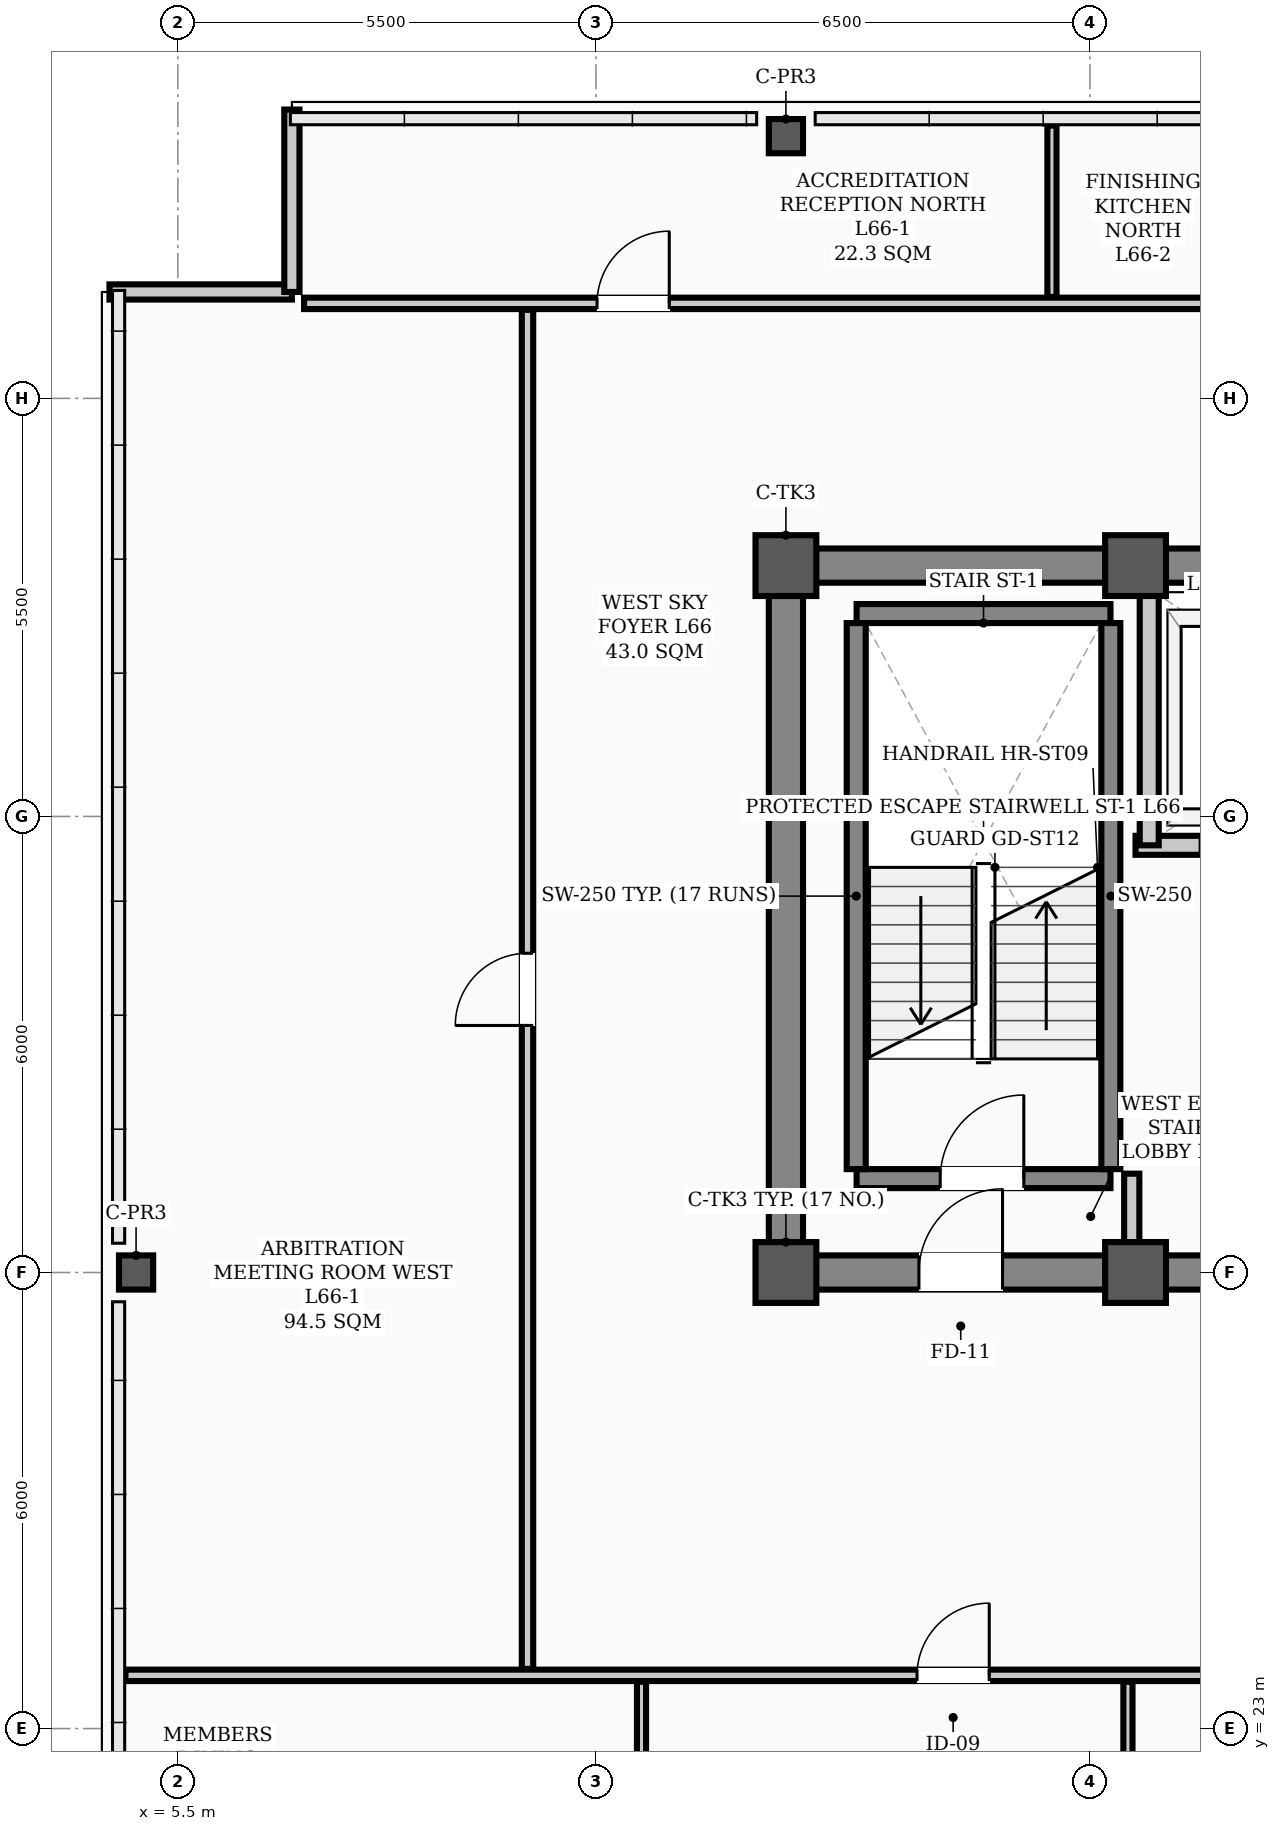
"""IFC4 building model, lengths in metres.
Left out: names, types, materials, properties, quantities, classifications, styles, units other than length and angle.
Written with IfcOpenShell. Run it as: python <this file> out.ifc"""

import sys

from ifc_helpers import new_model, si_unit, direction, frame, frame_2d, origin, origin_2d, place, context, subcontext, project, spatial, rectangle, hollow_rectangle, extrude, element, fill, save


model = new_model("IFC4")
c1 = context("Model", 3, precision=1e-05, world=origin(), true_north=direction((0.0, 1.0)))
c2 = subcontext(c1, "Body", "Model", "MODEL_VIEW")
j1 = project(units=[si_unit("LENGTHUNIT", "METRE"), si_unit("PLANEANGLEUNIT", "RADIAN")], contexts=[c1])
p1 = place(None, origin())
s1 = spatial("IfcSite", under=j1, at=p1, CompositionType="ELEMENT")
p2 = place(p1, origin())
s2 = spatial("IfcBuilding", under=s1, at=p2, CompositionType="ELEMENT")
p3 = place(p2, frame((0.0, 0.0, 265.7)))
s3 = spatial("IfcBuildingStorey", under=s2, at=p3, CompositionType="ELEMENT", Elevation=265.7)
for number, where, z_axis, x_axis in (
    (1, (13.5, 29.0, 0.0), (0.0, 0.0, 1.0), (1.0, 0.0, 0.0)),
    (2, (13.5, 38.3, 0.0), (0.0, 0.0, 1.0), (1.0, 0.0, 0.0)),
    (3, (18.1, 29.0, 0.0), (0.0, 0.0, 1.0), (1.0, 0.0, 0.0)),
    (4, (18.1, 38.3, 0.0), (0.0, 0.0, 1.0), (1.0, 0.0, 0.0)),
):
    element("IfcColumn", number, at=place(p3, frame(where, z_axis=z_axis, x_axis=x_axis)), inside=s3, PredefinedType="COLUMN", context=c2, shape_type="SweptSolid", body=[
        extrude(hollow_rectangle(XDim=0.8, YDim=0.8, WallThickness=0.032, InnerFilletRadius=0.016, OuterFilletRadius=0.048, at=origin_2d()), origin(), (0.0, 0.0, 1.0), 3.9),
    ])
for number, where, z_axis, x_axis in (
    (5, (4.95, 29.0, 0.0), (0.0, 0.0, 1.0), (1.0, 0.0, 0.0)),
    (6, (13.5, 43.95, 0.0), (0.0, 0.0, 1.0), (1.0, 0.0, 0.0)),
):
    element("IfcColumn", number, at=place(p3, frame(where, z_axis=z_axis, x_axis=x_axis)), inside=s3, PredefinedType="COLUMN", context=c2, shape_type="SweptSolid", body=[
        extrude(hollow_rectangle(XDim=0.45, YDim=0.45, WallThickness=0.022, InnerFilletRadius=0.022, OuterFilletRadius=0.044, at=origin_2d()), origin(), (0.0, 0.0, 1.0), 3.9),
    ])
p4 = place(p3, frame((4.6, 41.9, 0.0), z_axis=(0.0, 0.0, 1.0), x_axis=(1.0, 0.0, 0.0)))
e7 = element("IfcWall", 7, at=p4, inside=s3, PredefinedType="PARAPET", context=c2, shape_type="SweptSolid", body=[
    extrude(rectangle(XDim=2.4, YDim=0.2, at=frame_2d((1.2, 0.0))), origin(), (0.0, 0.0, 1.0), 1.2),
])
p5 = place(p3, frame((7.0, 41.9, 0.0), z_axis=(0.0, 0.0, 1.0), x_axis=(0.0, 1.0, 0.0)))
e8 = element("IfcWall", 8, at=p5, inside=s3, PredefinedType="PARAPET", context=c2, shape_type="SweptSolid", body=[
    extrude(rectangle(XDim=2.4, YDim=0.2, at=frame_2d((1.2, 0.0))), origin(), (0.0, 0.0, 1.0), 1.2),
])
p6 = place(p3, frame((13.5, 29.0, 0.0), z_axis=(0.0, 0.0, 1.0), x_axis=(1.0, 0.0, 0.0)))
e9 = element("IfcWall", 9, at=p6, inside=s3, PredefinedType="SHEAR", context=c2, shape_type="SweptSolid", body=[
    extrude(rectangle(XDim=30.5, YDim=0.45, at=frame_2d((15.25, 0.0))), origin(), (0.0, 0.0, 1.0), 3.72),
])
p7 = place(p6, frame((1.75, 0.0, 0.0)))
e10 = element("IfcOpeningElement", 10, at=p7, cuts=e9, PredefinedType="OPENING", context=c2, shape_type="SweptSolid", body=[
    extrude(rectangle(XDim=1.1, YDim=2.08, at=frame_2d((0.55, 1.04))), frame((0.0, 0.235, 0.0), z_axis=(0.0, -1.0, 0.0), x_axis=(1.0, 0.0, 0.0)), (0.0, 0.0, 1.0), 0.47),
])
p8 = place(p6, frame((26.7, 0.0, 0.0)))
e11 = element("IfcOpeningElement", 11, at=p8, cuts=e9, PredefinedType="OPENING", context=c2, shape_type="SweptSolid", body=[
    extrude(rectangle(XDim=1.1, YDim=2.08, at=frame_2d((0.55, 1.04))), frame((0.0, 0.235, 0.0), z_axis=(0.0, -1.0, 0.0), x_axis=(1.0, 0.0, 0.0)), (0.0, 0.0, 1.0), 0.47),
])
p9 = place(p6, frame((6.8, 0.0, 0.0)))
e12 = element("IfcOpeningElement", 12, at=p9, cuts=e9, PredefinedType="OPENING", context=c2, shape_type="SweptSolid", body=[
    extrude(rectangle(XDim=1.1, YDim=2.08, at=frame_2d((0.55, 1.04))), frame((0.0, 0.235, 0.0), z_axis=(0.0, -1.0, 0.0), x_axis=(1.0, 0.0, 0.0)), (0.0, 0.0, 1.0), 0.47),
])
p10 = place(p6, frame((13.2, 0.0, 0.0)))
e13 = element("IfcOpeningElement", 13, at=p10, cuts=e9, PredefinedType="OPENING", context=c2, shape_type="SweptSolid", body=[
    extrude(rectangle(XDim=1.6, YDim=2.08, at=frame_2d((0.8, 1.04))), frame((0.0, 0.235, 0.0), z_axis=(0.0, -1.0, 0.0), x_axis=(1.0, 0.0, 0.0)), (0.0, 0.0, 1.0), 0.47),
])
p11 = place(p6, frame((20.525, 0.0, 0.0)))
e14 = element("IfcOpeningElement", 14, at=p11, cuts=e9, PredefinedType="OPENING", context=c2, shape_type="SweptSolid", body=[
    extrude(rectangle(XDim=0.95, YDim=2.08, at=frame_2d((0.475, 1.04))), frame((0.0, 0.235, 0.0), z_axis=(0.0, -1.0, 0.0), x_axis=(1.0, 0.0, 0.0)), (0.0, 0.0, 1.0), 0.47),
])
p12 = place(p3, frame((13.5, 38.3, 0.0), z_axis=(0.0, 0.0, 1.0), x_axis=(1.0, 0.0, 0.0)))
e15 = element("IfcWall", 15, at=p12, inside=s3, PredefinedType="SHEAR", context=c2, shape_type="SweptSolid", body=[
    extrude(rectangle(XDim=30.5, YDim=0.45, at=frame_2d((15.25, 0.0))), origin(), (0.0, 0.0, 1.0), 3.72),
])
p13 = place(p3, frame((13.5, 29.35, 0.0), z_axis=(0.0, 0.0, 1.0), x_axis=(0.0, 1.0, 0.0)))
e16 = element("IfcWall", 16, at=p13, inside=s3, PredefinedType="SHEAR", context=c2, shape_type="SweptSolid", body=[
    extrude(rectangle(XDim=8.6, YDim=0.45, at=frame_2d((4.3, 0.0))), origin(), (0.0, 0.0, 1.0), 3.72),
])
p14 = place(p3, frame((14.43, 30.235, 0.0), z_axis=(0.0, 0.0, 1.0), x_axis=(1.0, 0.0, 0.0)))
e17 = element("IfcWall", 17, at=p14, inside=s3, PredefinedType="STANDARD", context=c2, shape_type="SweptSolid", body=[
    extrude(rectangle(XDim=3.34, YDim=0.25, at=frame_2d((1.67, 0.0))), origin(), (0.0, 0.0, 1.0), 3.72),
])
p15 = place(p14, frame((1.1, 0.0, 0.0)))
e18 = element("IfcOpeningElement", 18, at=p15, cuts=e17, PredefinedType="OPENING", context=c2, shape_type="SweptSolid", body=[
    extrude(rectangle(XDim=1.1, YDim=2.08, at=frame_2d((0.55, 1.04))), frame((0.0, 0.135, 0.0), z_axis=(0.0, -1.0, 0.0), x_axis=(1.0, 0.0, 0.0)), (0.0, 0.0, 1.0), 0.27),
])
p16 = place(p3, frame((14.43, 37.669, 0.0), z_axis=(0.0, 0.0, 1.0), x_axis=(1.0, 0.0, 0.0)))
e19 = element("IfcWall", 19, at=p16, inside=s3, PredefinedType="STANDARD", context=c2, shape_type="SweptSolid", body=[
    extrude(rectangle(XDim=3.34, YDim=0.25, at=frame_2d((1.67, 0.0))), origin(), (0.0, 0.0, 1.0), 3.72),
])
for number, where, z_axis, x_axis in (
    (20, (14.425, 30.36, 0.0), (0.0, 0.0, 1.0), (0.0, 1.0, 0.0)),
    (21, (17.775, 30.36, 0.0), (0.0, 0.0, 1.0), (0.0, 1.0, 0.0)),
):
    element("IfcWall", number, at=place(p3, frame(where, z_axis=z_axis, x_axis=x_axis)), inside=s3, PredefinedType="STANDARD", context=c2, shape_type="SweptSolid", body=[
        extrude(rectangle(XDim=7.184, YDim=0.25, at=frame_2d((3.592, 0.0))), origin(), (0.0, 0.0, 1.0), 3.72),
    ])
p17 = place(p3, frame((18.1, 34.62, 0.0), z_axis=(0.0, 0.0, 1.0), x_axis=(1.0, 0.0, 0.0)))
e22 = element("IfcWall", 22, at=p17, inside=s3, PredefinedType="STANDARD", context=c2, shape_type="SweptSolid", body=[
    extrude(rectangle(XDim=5.35, YDim=0.25, at=frame_2d((2.675, 0.0))), origin(), (0.0, 0.0, 1.0), 3.72),
])
p18 = place(p17, frame((0.85, 0.0, 0.0)))
e23 = element("IfcOpeningElement", 23, at=p18, cuts=e22, PredefinedType="OPENING", context=c2, shape_type="SweptSolid", body=[
    extrude(rectangle(XDim=1.1, YDim=2.08, at=frame_2d((0.55, 1.04))), frame((0.0, 0.135, 0.0), z_axis=(0.0, -1.0, 0.0), x_axis=(1.0, 0.0, 0.0)), (0.0, 0.0, 1.0), 0.27),
])
p19 = place(p17, frame((3.45, 0.0, 0.0)))
e24 = element("IfcOpeningElement", 24, at=p19, cuts=e22, PredefinedType="OPENING", context=c2, shape_type="SweptSolid", body=[
    extrude(rectangle(XDim=1.1, YDim=2.08, at=frame_2d((0.55, 1.04))), frame((0.0, 0.135, 0.0), z_axis=(0.0, -1.0, 0.0), x_axis=(1.0, 0.0, 0.0)), (0.0, 0.0, 1.0), 0.27),
])
p20 = place(p3, frame((18.28, 34.62, 0.0), z_axis=(0.0, 0.0, 1.0), x_axis=(0.0, 1.0, 0.0)))
e25 = element("IfcWall", 25, at=p20, inside=s3, PredefinedType="STANDARD", context=c2, shape_type="SweptSolid", body=[
    extrude(rectangle(XDim=3.33, YDim=0.25, at=frame_2d((1.665, 0.0))), origin(), (0.0, 0.0, 1.0), 3.4),
])
p21 = place(p3, frame((4.81, 23.7, 0.0), z_axis=(0.0, 0.0, 1.0), x_axis=(1.0, 0.0, 0.0)))
e26 = element("IfcWall", 26, at=p21, inside=s3, PredefinedType="PARTITIONING", context=c2, shape_type="SweptSolid", body=[
    extrude(rectangle(XDim=40.88, YDim=0.15, at=frame_2d((20.44, 0.0))), origin(), (0.0, 0.0, 1.0), 3.2),
])
p22 = place(p21, frame((10.415, 0.0, 0.0)))
e27 = element("IfcOpeningElement", 27, at=p22, cuts=e26, PredefinedType="OPENING", context=c2, shape_type="SweptSolid", body=[
    extrude(rectangle(XDim=0.95, YDim=2.08, at=frame_2d((0.475, 1.04))), frame((0.0, 0.085, 0.0), z_axis=(0.0, -1.0, 0.0), x_axis=(1.0, 0.0, 0.0)), (0.0, 0.0, 1.0), 0.17),
])
p23 = place(p21, frame((16.015, 0.0, 0.0)))
e28 = element("IfcOpeningElement", 28, at=p23, cuts=e26, PredefinedType="OPENING", context=c2, shape_type="SweptSolid", body=[
    extrude(rectangle(XDim=0.95, YDim=2.08, at=frame_2d((0.475, 1.04))), frame((0.0, 0.085, 0.0), z_axis=(0.0, -1.0, 0.0), x_axis=(1.0, 0.0, 0.0)), (0.0, 0.0, 1.0), 0.17),
])
p24 = place(p21, frame((22.715, 0.0, 0.0)))
e29 = element("IfcOpeningElement", 29, at=p24, cuts=e26, PredefinedType="OPENING", context=c2, shape_type="SweptSolid", body=[
    extrude(rectangle(XDim=0.95, YDim=2.08, at=frame_2d((0.475, 1.04))), frame((0.0, 0.085, 0.0), z_axis=(0.0, -1.0, 0.0), x_axis=(1.0, 0.0, 0.0)), (0.0, 0.0, 1.0), 0.17),
])
p25 = place(p21, frame((29.415, 0.0, 0.0)))
e30 = element("IfcOpeningElement", 30, at=p25, cuts=e26, PredefinedType="OPENING", context=c2, shape_type="SweptSolid", body=[
    extrude(rectangle(XDim=0.95, YDim=2.08, at=frame_2d((0.475, 1.04))), frame((0.0, 0.085, 0.0), z_axis=(0.0, -1.0, 0.0), x_axis=(1.0, 0.0, 0.0)), (0.0, 0.0, 1.0), 0.17),
])
p26 = place(p21, frame((36.56, 0.0, 0.0)))
e31 = element("IfcOpeningElement", 31, at=p26, cuts=e26, PredefinedType="OPENING", context=c2, shape_type="SweptSolid", body=[
    extrude(rectangle(XDim=0.95, YDim=2.08, at=frame_2d((0.475, 1.04))), frame((0.0, 0.085, 0.0), z_axis=(0.0, -1.0, 0.0), x_axis=(1.0, 0.0, 0.0)), (0.0, 0.0, 1.0), 0.17),
])
p27 = place(p3, frame((7.16, 41.75, 0.0), z_axis=(0.0, 0.0, 1.0), x_axis=(1.0, 0.0, 0.0)))
e32 = element("IfcWall", 32, at=p27, inside=s3, PredefinedType="PARTITIONING", context=c2, shape_type="SweptSolid", body=[
    extrude(rectangle(XDim=36.18, YDim=0.15, at=frame_2d((18.09, 0.0))), origin(), (0.0, 0.0, 1.0), 3.2),
])
p28 = place(p27, frame((3.855, 0.0, 0.0)))
e33 = element("IfcOpeningElement", 33, at=p28, cuts=e32, PredefinedType="OPENING", context=c2, shape_type="SweptSolid", body=[
    extrude(rectangle(XDim=0.95, YDim=2.08, at=frame_2d((0.475, 1.04))), frame((0.0, 0.085, 0.0), z_axis=(0.0, -1.0, 0.0), x_axis=(1.0, 0.0, 0.0)), (0.0, 0.0, 1.0), 0.17),
])
p29 = place(p27, frame((13.165, 0.0, 0.0)))
e34 = element("IfcOpeningElement", 34, at=p29, cuts=e32, PredefinedType="OPENING", context=c2, shape_type="SweptSolid", body=[
    extrude(rectangle(XDim=0.95, YDim=2.08, at=frame_2d((0.475, 1.04))), frame((0.0, 0.085, 0.0), z_axis=(0.0, -1.0, 0.0), x_axis=(1.0, 0.0, 0.0)), (0.0, 0.0, 1.0), 0.17),
])
p30 = place(p27, frame((20.765, 0.0, 0.0)))
e35 = element("IfcOpeningElement", 35, at=p30, cuts=e32, PredefinedType="OPENING", context=c2, shape_type="SweptSolid", body=[
    extrude(rectangle(XDim=0.95, YDim=2.08, at=frame_2d((0.475, 1.04))), frame((0.0, 0.085, 0.0), z_axis=(0.0, -1.0, 0.0), x_axis=(1.0, 0.0, 0.0)), (0.0, 0.0, 1.0), 0.17),
])
p31 = place(p27, frame((28.365, 0.0, 0.0)))
e36 = element("IfcOpeningElement", 36, at=p31, cuts=e32, PredefinedType="OPENING", context=c2, shape_type="SweptSolid", body=[
    extrude(rectangle(XDim=0.95, YDim=2.08, at=frame_2d((0.475, 1.04))), frame((0.0, 0.085, 0.0), z_axis=(0.0, -1.0, 0.0), x_axis=(1.0, 0.0, 0.0)), (0.0, 0.0, 1.0), 0.17),
])
p32 = place(p27, frame((34.265, 0.0, 0.0)))
e37 = element("IfcOpeningElement", 37, at=p32, cuts=e32, PredefinedType="OPENING", context=c2, shape_type="SweptSolid", body=[
    extrude(rectangle(XDim=0.95, YDim=2.08, at=frame_2d((0.475, 1.04))), frame((0.0, 0.085, 0.0), z_axis=(0.0, -1.0, 0.0), x_axis=(1.0, 0.0, 0.0)), (0.0, 0.0, 1.0), 0.17),
])
p33 = place(p3, frame((18.05, 29.235, 0.0), z_axis=(0.0, 0.0, 1.0), x_axis=(0.0, 1.0, 0.0)))
e38 = element("IfcWall", 38, at=p33, inside=s3, PredefinedType="STANDARD", context=c2, shape_type="SweptSolid", body=[
    extrude(rectangle(XDim=1.065, YDim=0.2, at=frame_2d((0.532, 0.0))), origin(), (0.0, 0.0, 1.0), 3.4),
])
p34 = place(p3, frame((10.1, 23.785, 0.0), z_axis=(0.0, 0.0, 1.0), x_axis=(0.0, 1.0, 0.0)))
e39 = element("IfcWall", 39, at=p34, inside=s3, PredefinedType="PARTITIONING", context=c2, shape_type="SweptSolid", body=[
    extrude(rectangle(XDim=17.88, YDim=0.15, at=frame_2d((8.94, 0.0))), origin(), (0.0, 0.0, 1.0), 3.1),
])
p35 = place(p34, frame((8.465, 0.0, 0.0)))
e40 = element("IfcOpeningElement", 40, at=p35, cuts=e39, PredefinedType="OPENING", context=c2, shape_type="SweptSolid", body=[
    extrude(rectangle(XDim=0.95, YDim=2.08, at=frame_2d((0.475, 1.04))), frame((0.0, 0.085, 0.0), z_axis=(0.0, -1.0, 0.0), x_axis=(1.0, 0.0, 0.0)), (0.0, 0.0, 1.0), 0.17),
])
p36 = place(p3, frame((11.6, 17.91, 0.0), z_axis=(0.0, 0.0, 1.0), x_axis=(0.0, 1.0, 0.0)))
e41 = element("IfcWall", 41, at=p36, inside=s3, PredefinedType="PARTITIONING", context=c2, shape_type="SweptSolid", body=[
    extrude(rectangle(XDim=5.705, YDim=0.12, at=frame_2d((2.853, 0.0))), origin(), (0.0, 0.0, 1.0), 3.72),
])
p37 = place(p36, frame((3.815, 0.0, 0.0)))
e42 = element("IfcOpeningElement", 42, at=p37, cuts=e41, PredefinedType="OPENING", context=c2, shape_type="SweptSolid", body=[
    extrude(rectangle(XDim=0.95, YDim=2.08, at=frame_2d((0.475, 1.04))), frame((0.0, 0.07, 0.0), z_axis=(0.0, -1.0, 0.0), x_axis=(1.0, 0.0, 0.0)), (0.0, 0.0, 1.0), 0.14),
])
p38 = place(p3, frame((18.0, 17.91, 0.0), z_axis=(0.0, 0.0, 1.0), x_axis=(0.0, 1.0, 0.0)))
e43 = element("IfcWall", 43, at=p38, inside=s3, PredefinedType="PARTITIONING", context=c2, shape_type="SweptSolid", body=[
    extrude(rectangle(XDim=5.705, YDim=0.12, at=frame_2d((2.853, 0.0))), origin(), (0.0, 0.0, 1.0), 3.1),
])
p39 = place(p3, frame((17.0, 41.835, 0.0), z_axis=(0.0, 0.0, 1.0), x_axis=(0.0, 1.0, 0.0)))
e44 = element("IfcWall", 44, at=p39, inside=s3, PredefinedType="PARTITIONING", context=c2, shape_type="SweptSolid", body=[
    extrude(rectangle(XDim=2.255, YDim=0.12, at=frame_2d((1.127, 0.0))), origin(), (0.0, 0.0, 1.0), 3.212),
])
p40 = place(p15, origin())
e45 = element("IfcDoor", 45, at=p40, inside=s3, OperationType="SINGLE_SWING_RIGHT", PredefinedType="DOOR", context=c2, shape_type="SweptSolid", body=[
    extrude(rectangle(XDim=1.1, YDim=2.08, at=frame_2d((0.55, 1.04))), frame((0.0, 0.025, 0.0), z_axis=(0.0, -1.0, 0.0), x_axis=(1.0, 0.0, 0.0)), (0.0, 0.0, 1.0), 0.05),
])
fill(e18, e45)
p41 = place(p7, origin())
e46 = element("IfcDoor", 46, at=p41, inside=s3, OperationType="SINGLE_SWING_RIGHT", PredefinedType="DOOR", context=c2, shape_type="SweptSolid", body=[
    extrude(rectangle(XDim=1.1, YDim=2.08, at=frame_2d((0.55, 1.04))), frame((0.0, 0.025, 0.0), z_axis=(0.0, -1.0, 0.0), x_axis=(1.0, 0.0, 0.0)), (0.0, 0.0, 1.0), 0.05),
])
fill(e10, e46)
p42 = place(p22, origin())
e47 = element("IfcDoor", 47, at=p42, inside=s3, OperationType="SINGLE_SWING_RIGHT", PredefinedType="DOOR", context=c2, shape_type="SweptSolid", body=[
    extrude(rectangle(XDim=0.95, YDim=2.08, at=frame_2d((0.475, 1.04))), frame((0.0, 0.025, 0.0), z_axis=(0.0, -1.0, 0.0), x_axis=(1.0, 0.0, 0.0)), (0.0, 0.0, 1.0), 0.05),
])
fill(e27, e47)
p43 = place(p35, origin())
e48 = element("IfcDoor", 48, at=p43, inside=s3, OperationType="SINGLE_SWING_LEFT", PredefinedType="DOOR", context=c2, shape_type="SweptSolid", body=[
    extrude(rectangle(XDim=0.95, YDim=2.08, at=frame_2d((0.475, 1.04))), frame((0.0, 0.025, 0.0), z_axis=(0.0, -1.0, 0.0), x_axis=(1.0, 0.0, 0.0)), (0.0, 0.0, 1.0), 0.05),
])
fill(e40, e48)
p44 = place(p28, origin())
e49 = element("IfcDoor", 49, at=p44, inside=s3, OperationType="SINGLE_SWING_RIGHT", PredefinedType="DOOR", context=c2, shape_type="SweptSolid", body=[
    extrude(rectangle(XDim=0.95, YDim=2.08, at=frame_2d((0.475, 1.04))), frame((0.0, 0.025, 0.0), z_axis=(0.0, -1.0, 0.0), x_axis=(1.0, 0.0, 0.0)), (0.0, 0.0, 1.0), 0.05),
])
fill(e33, e49)
save(model, sys.argv[1])
